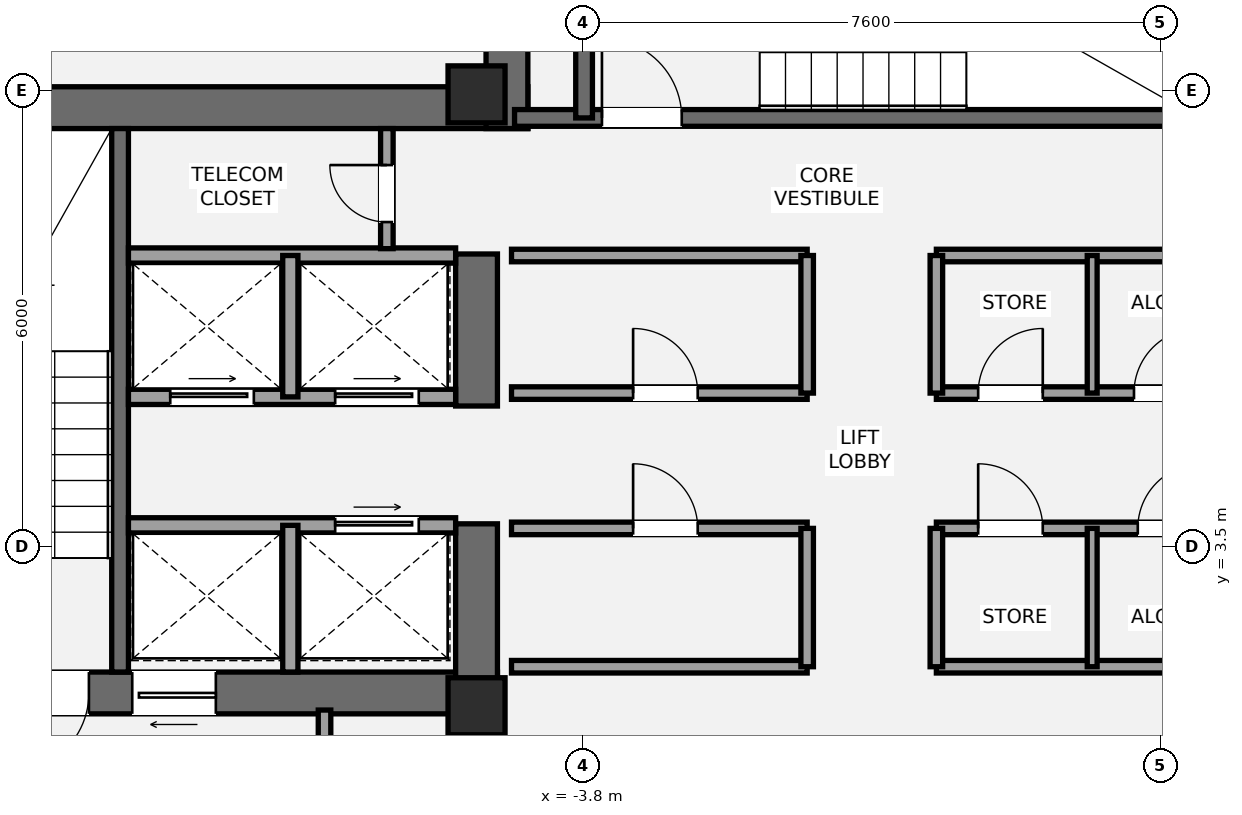
"""IFC4 building model, lengths in metres.
Left out: names, types, materials, properties, quantities, classifications, styles, units other than length and angle.
Written with IfcOpenShell. Run it as: python <this file> out.ifc"""

import sys

from ifc_helpers import new_model, si_unit, direction, frame, frame_2d, origin, origin_2d, place, context, subcontext, project, spatial, rectangle, extrude, element, fill, save


model = new_model("IFC4")
c1 = context("Model", 3, precision=1e-05, world=origin(), true_north=direction((0.0, 1.0)))
c2 = subcontext(c1, "Body", "Model", "MODEL_VIEW")
j1 = project(units=[si_unit("LENGTHUNIT", "METRE"), si_unit("PLANEANGLEUNIT", "RADIAN")], contexts=[c1])
p1 = place(None, origin())
s1 = spatial("IfcSite", under=j1, at=p1, CompositionType="ELEMENT")
p2 = place(p1, origin())
s2 = spatial("IfcBuilding", under=s1, at=p2, CompositionType="ELEMENT")
p3 = place(p2, frame((0.0, 0.0, 250.95)))
s3 = spatial("IfcBuildingStorey", under=s2, at=p3, CompositionType="ELEMENT", Elevation=250.95)
p4 = place(p3, frame((-13.7, 9.275, 0.0), z_axis=(0.0, 0.0, 1.0), x_axis=(1.0, 0.0, 0.0)))
e1 = element("IfcWall", 1, at=p4, inside=s3, PredefinedType="SHEAR", context=c2, shape_type="SweptSolid", body=[
    extrude(rectangle(XDim=9.175, YDim=0.55, at=frame_2d((4.587, 0.0))), origin(), (0.0, 0.0, 1.0), 3.15),
])
p5 = place(p3, frame((-4.925, 1.575, 0.0), z_axis=(0.0, 0.0, 1.0), x_axis=(-1.0, 0.0, 0.0)))
e2 = element("IfcWall", 2, at=p5, inside=s3, PredefinedType="SHEAR", context=c2, shape_type="SweptSolid", body=[
    extrude(rectangle(XDim=8.775, YDim=0.55, at=frame_2d((4.387, 0.0))), origin(), (0.0, 0.0, 1.0), 3.15),
])
p6 = place(p5, frame((5.375, 0.0, 0.0)))
e3 = element("IfcOpeningElement", 3, at=p6, cuts=e2, PredefinedType="OPENING", context=c2, shape_type="SweptSolid", body=[
    extrude(rectangle(XDim=1.05, YDim=2.15, at=frame_2d((0.525, 1.075))), frame((0.0, 0.285, 0.0), z_axis=(0.0, -1.0, 0.0), x_axis=(1.0, 0.0, 0.0)), (0.0, 0.0, 1.0), 0.57),
])
p7 = place(p5, frame((3.705, 0.0, 0.0)))
e4 = element("IfcOpeningElement", 4, at=p7, cuts=e2, PredefinedType="OPENING", context=c2, shape_type="SweptSolid", body=[
    extrude(rectangle(XDim=1.1, YDim=2.2, at=frame_2d((0.55, 1.1))), frame((0.0, 0.285, 0.0), z_axis=(0.0, -1.0, 0.0), x_axis=(1.0, 0.0, 0.0)), (0.0, 0.0, 1.0), 0.57),
])
p8 = place(p3, frame((-5.2, 1.3, 0.0), z_axis=(0.0, 0.0, 1.0), x_axis=(0.0, 1.0, 0.0)))
e5 = element("IfcWall", 5, at=p8, inside=s3, PredefinedType="SHEAR", context=c2, shape_type="SweptSolid", body=[
    extrude(rectangle(XDim=2.5, YDim=0.55, at=frame_2d((1.25, 0.0))), origin(), (0.0, 0.0, 1.0), 3.15),
])
p9 = place(p3, frame((-5.2, 5.35, 0.0), z_axis=(0.0, 0.0, 1.0), x_axis=(0.0, 1.0, 0.0)))
e6 = element("IfcWall", 6, at=p9, inside=s3, PredefinedType="SHEAR", context=c2, shape_type="SweptSolid", body=[
    extrude(rectangle(XDim=2.0, YDim=0.55, at=frame_2d((1.0, 0.0))), origin(), (0.0, 0.0, 1.0), 3.15),
])
p10 = place(p3, frame((-9.89, 1.85, 0.0), z_axis=(0.0, 0.0, 1.0), x_axis=(0.0, 1.0, 0.0)))
e7 = element("IfcWall", 7, at=p10, inside=s3, PredefinedType="SHEAR", context=c2, shape_type="SweptSolid", body=[
    extrude(rectangle(XDim=7.15, YDim=0.22, at=frame_2d((3.575, 0.0))), origin(), (0.0, 0.0, 1.0), 3.15),
])
p11 = place(p3, frame((-4.8, 9.0, 0.0), z_axis=(0.0, 0.0, 1.0), x_axis=(0.0, 1.0, 0.0)))
e8 = element("IfcWall", 8, at=p11, inside=s3, PredefinedType="SHEAR", context=c2, shape_type="SweptSolid", body=[
    extrude(rectangle(XDim=3.95, YDim=0.55, at=frame_2d((1.975, 0.0))), origin(), (0.0, 0.0, 1.0), 3.15),
])
p12 = place(p3, frame((-4.7, 9.14, 0.0), z_axis=(0.0, 0.0, 1.0), x_axis=(1.0, 0.0, 0.0)))
e9 = element("IfcWall", 9, at=p12, inside=s3, PredefinedType="SHEAR", context=c2, shape_type="SweptSolid", body=[
    extrude(rectangle(XDim=9.3, YDim=0.22, at=frame_2d((4.65, 0.0))), origin(), (0.0, 0.0, 1.0), 3.15),
])
p13 = place(p12, frame((1.15, 0.0, 0.0)))
e10 = element("IfcOpeningElement", 10, at=p13, cuts=e9, PredefinedType="OPENING", context=c2, shape_type="SweptSolid", body=[
    extrude(rectangle(XDim=1.05, YDim=2.15, at=frame_2d((0.525, 1.075))), frame((0.0, 0.12, 0.0), z_axis=(0.0, -1.0, 0.0), x_axis=(1.0, 0.0, 0.0)), (0.0, 0.0, 1.0), 0.24),
])
p14 = place(p3, frame((-3.785, 9.14, 0.0), z_axis=(0.0, 0.0, 1.0), x_axis=(0.0, 1.0, 0.0)))
e11 = element("IfcWall", 11, at=p14, inside=s3, PredefinedType="SHEAR", context=c2, shape_type="SweptSolid", body=[
    extrude(rectangle(XDim=3.26, YDim=0.22, at=frame_2d((1.63, 0.0))), origin(), (0.0, 0.0, 1.0), 3.15),
])
for number, where, z_axis, x_axis in (
    (12, (-5.2, 1.4, 0.0), (0.0, 0.0, 1.0), (1.0, 0.0, 0.0)),
    (13, (-5.2, 9.45, 0.0), (0.0, 0.0, 1.0), (1.0, 0.0, 0.0)),
):
    element("IfcColumn", number, at=place(p3, frame(where, z_axis=z_axis, x_axis=x_axis)), inside=s3, PredefinedType="PILASTER", context=c2, shape_type="SweptSolid", body=[
        extrude(rectangle(XDim=0.75, YDim=0.75, at=origin_2d()), origin(), (0.0, 0.0, 1.0), 3.15),
    ])
p15 = place(p3, frame((-7.2, -2.15, 0.0), z_axis=(0.0, 0.0, 1.0), x_axis=(0.0, 1.0, 0.0)))
e14 = element("IfcWall", 14, at=p15, inside=s3, PredefinedType="PARTITIONING", context=c2, shape_type="SweptSolid", body=[
    extrude(rectangle(XDim=3.5, YDim=0.165, at=frame_2d((1.75, 0.0))), origin(), (0.0, 0.0, 1.0), 2.423),
])
p16 = place(p3, frame((-4.95, -2.15, 0.0), z_axis=(0.0, 0.0, 1.0), x_axis=(0.0, 1.0, 0.0)))
e15 = element("IfcWall", 15, at=p16, inside=s3, PredefinedType="SOLIDWALL", context=c2, shape_type="SweptSolid", body=[
    extrude(rectangle(XDim=3.5, YDim=0.2, at=frame_2d((1.75, 0.0))), origin(), (0.0, 0.0, 1.0), 2.423),
])
p17 = place(p16, frame((0.95, 0.0, 0.0)))
e16 = element("IfcOpeningElement", 16, at=p17, cuts=e15, PredefinedType="OPENING", context=c2, shape_type="SweptSolid", body=[
    extrude(rectangle(XDim=0.75, YDim=2.1, at=frame_2d((0.375, 1.05))), frame((0.0, 0.11, 0.0), z_axis=(0.0, -1.0, 0.0), x_axis=(1.0, 0.0, 0.0)), (0.0, 0.0, 1.0), 0.22),
])
p18 = place(p3, frame((-9.78, 3.78, 0.0), z_axis=(0.0, 0.0, 1.0), x_axis=(1.0, 0.0, 0.0)))
e17 = element("IfcWall", 17, at=p18, inside=s3, PredefinedType="SOLIDWALL", context=c2, shape_type="SweptSolid", body=[
    extrude(rectangle(XDim=4.305, YDim=0.2, at=frame_2d((2.152, 0.0))), origin(), (0.0, 0.0, 1.0), 2.97),
])
p19 = place(p18, frame((2.72, 0.0, 0.0)))
e18 = element("IfcOpeningElement", 18, at=p19, cuts=e17, PredefinedType="OPENING", context=c2, shape_type="SweptSolid", body=[
    extrude(rectangle(XDim=1.1, YDim=2.2, at=frame_2d((0.55, 1.1))), frame((0.0, 0.11, 0.0), z_axis=(0.0, -1.0, 0.0), x_axis=(1.0, 0.0, 0.0)), (0.0, 0.0, 1.0), 0.22),
])
p20 = place(p3, frame((-7.65, 1.85, 0.0), z_axis=(0.0, 0.0, 1.0), x_axis=(0.0, 1.0, 0.0)))
e19 = element("IfcWall", 19, at=p20, inside=s3, PredefinedType="SOLIDWALL", context=c2, shape_type="SweptSolid", body=[
    extrude(rectangle(XDim=1.93, YDim=0.2, at=frame_2d((0.965, 0.0))), origin(), (0.0, 0.0, 1.0), 2.97),
])
p21 = place(p3, frame((-9.78, 5.47, 0.0), z_axis=(0.0, 0.0, 1.0), x_axis=(1.0, 0.0, 0.0)))
e20 = element("IfcWall", 20, at=p21, inside=s3, PredefinedType="SOLIDWALL", context=c2, shape_type="SweptSolid", body=[
    extrude(rectangle(XDim=4.305, YDim=0.2, at=frame_2d((2.152, 0.0))), origin(), (0.0, 0.0, 1.0), 2.97),
])
p22 = place(p21, frame((0.55, 0.0, 0.0)))
e21 = element("IfcOpeningElement", 21, at=p22, cuts=e20, PredefinedType="OPENING", context=c2, shape_type="SweptSolid", body=[
    extrude(rectangle(XDim=1.1, YDim=2.2, at=frame_2d((0.55, 1.1))), frame((0.0, 0.11, 0.0), z_axis=(0.0, -1.0, 0.0), x_axis=(1.0, 0.0, 0.0)), (0.0, 0.0, 1.0), 0.22),
])
p23 = place(p21, frame((2.72, 0.0, 0.0)))
e22 = element("IfcOpeningElement", 22, at=p23, cuts=e20, PredefinedType="OPENING", context=c2, shape_type="SweptSolid", body=[
    extrude(rectangle(XDim=1.1, YDim=2.2, at=frame_2d((0.55, 1.1))), frame((0.0, 0.11, 0.0), z_axis=(0.0, -1.0, 0.0), x_axis=(1.0, 0.0, 0.0)), (0.0, 0.0, 1.0), 0.22),
])
p24 = place(p3, frame((-9.78, 7.33, 0.0), z_axis=(0.0, 0.0, 1.0), x_axis=(1.0, 0.0, 0.0)))
e23 = element("IfcWall", 23, at=p24, inside=s3, PredefinedType="SOLIDWALL", context=c2, shape_type="SweptSolid", body=[
    extrude(rectangle(XDim=4.305, YDim=0.2, at=frame_2d((2.152, 0.0))), origin(), (0.0, 0.0, 1.0), 2.97),
])
p25 = place(p3, frame((-7.65, 5.47, 0.0), z_axis=(0.0, 0.0, 1.0), x_axis=(0.0, 1.0, 0.0)))
e24 = element("IfcWall", 24, at=p25, inside=s3, PredefinedType="SOLIDWALL", context=c2, shape_type="SweptSolid", body=[
    extrude(rectangle(XDim=1.86, YDim=0.2, at=frame_2d((0.93, 0.0))), origin(), (0.0, 0.0, 1.0), 2.97),
])
p26 = place(p3, frame((-4.74, 1.92, 0.0), z_axis=(0.0, 0.0, 1.0), x_axis=(1.0, 0.0, 0.0)))
e25 = element("IfcWall", 25, at=p26, inside=s3, PredefinedType="PARTITIONING", context=c2, shape_type="SweptSolid", body=[
    extrude(rectangle(XDim=3.89, YDim=0.165, at=frame_2d((1.945, 0.0))), origin(), (0.0, 0.0, 1.0), 2.11),
])
p27 = place(p3, frame((-4.74, 3.74, 0.0), z_axis=(0.0, 0.0, 1.0), x_axis=(1.0, 0.0, 0.0)))
e26 = element("IfcWall", 26, at=p27, inside=s3, PredefinedType="PARTITIONING", context=c2, shape_type="SweptSolid", body=[
    extrude(rectangle(XDim=3.89, YDim=0.165, at=frame_2d((1.945, 0.0))), origin(), (0.0, 0.0, 1.0), 2.97),
])
p28 = place(p27, frame((1.6, 0.0, 0.0)))
e27 = element("IfcOpeningElement", 27, at=p28, cuts=e26, PredefinedType="OPENING", context=c2, shape_type="SweptSolid", body=[
    extrude(rectangle(XDim=0.85, YDim=2.1, at=frame_2d((0.425, 1.05))), frame((0.0, 0.093, 0.0), z_axis=(0.0, -1.0, 0.0), x_axis=(1.0, 0.0, 0.0)), (0.0, 0.0, 1.0), 0.185),
])
p29 = place(p3, frame((-0.85, 1.92, 0.0), z_axis=(0.0, 0.0, 1.0), x_axis=(0.0, 1.0, 0.0)))
e28 = element("IfcWall", 28, at=p29, inside=s3, PredefinedType="PARTITIONING", context=c2, shape_type="SweptSolid", body=[
    extrude(rectangle(XDim=1.82, YDim=0.165, at=frame_2d((0.91, 0.0))), origin(), (0.0, 0.0, 1.0), 2.97),
])
p30 = place(p3, frame((0.85, 1.92, 0.0), z_axis=(0.0, 0.0, 1.0), x_axis=(1.0, 0.0, 0.0)))
e29 = element("IfcWall", 29, at=p30, inside=s3, PredefinedType="PARTITIONING", context=c2, shape_type="SweptSolid", body=[
    extrude(rectangle(XDim=3.89, YDim=0.165, at=frame_2d((1.945, 0.0))), origin(), (0.0, 0.0, 1.0), 2.11),
])
p31 = place(p3, frame((0.85, 3.74, 0.0), z_axis=(0.0, 0.0, 1.0), x_axis=(1.0, 0.0, 0.0)))
e30 = element("IfcWall", 30, at=p31, inside=s3, PredefinedType="PARTITIONING", context=c2, shape_type="SweptSolid", body=[
    extrude(rectangle(XDim=3.89, YDim=0.165, at=frame_2d((1.945, 0.0))), origin(), (0.0, 0.0, 1.0), 2.97),
])
p32 = place(p31, frame((0.55, 0.0, 0.0)))
e31 = element("IfcOpeningElement", 31, at=p32, cuts=e30, PredefinedType="OPENING", context=c2, shape_type="SweptSolid", body=[
    extrude(rectangle(XDim=0.85, YDim=2.1, at=frame_2d((0.425, 1.05))), frame((0.0, 0.093, 0.0), z_axis=(0.0, -1.0, 0.0), x_axis=(1.0, 0.0, 0.0)), (0.0, 0.0, 1.0), 0.185),
])
p33 = place(p31, frame((2.65, 0.0, 0.0)))
e32 = element("IfcOpeningElement", 32, at=p33, cuts=e30, PredefinedType="OPENING", context=c2, shape_type="SweptSolid", body=[
    extrude(rectangle(XDim=0.85, YDim=2.1, at=frame_2d((0.425, 1.05))), frame((0.0, 0.093, 0.0), z_axis=(0.0, -1.0, 0.0), x_axis=(1.0, 0.0, 0.0)), (0.0, 0.0, 1.0), 0.185),
])
p34 = place(p3, frame((0.85, 1.92, 0.0), z_axis=(0.0, 0.0, 1.0), x_axis=(0.0, 1.0, 0.0)))
e33 = element("IfcWall", 33, at=p34, inside=s3, PredefinedType="PARTITIONING", context=c2, shape_type="SweptSolid", body=[
    extrude(rectangle(XDim=1.82, YDim=0.165, at=frame_2d((0.91, 0.0))), origin(), (0.0, 0.0, 1.0), 2.97),
])
p35 = place(p3, frame((2.9, 1.92, 0.0), z_axis=(0.0, 0.0, 1.0), x_axis=(0.0, 1.0, 0.0)))
e34 = element("IfcWall", 34, at=p35, inside=s3, PredefinedType="PARTITIONING", context=c2, shape_type="SweptSolid", body=[
    extrude(rectangle(XDim=1.82, YDim=0.13, at=frame_2d((0.91, 0.0))), origin(), (0.0, 0.0, 1.0), 2.97),
])
p36 = place(p3, frame((-4.74, 5.52, 0.0), z_axis=(0.0, 0.0, 1.0), x_axis=(1.0, 0.0, 0.0)))
e35 = element("IfcWall", 35, at=p36, inside=s3, PredefinedType="PARTITIONING", context=c2, shape_type="SweptSolid", body=[
    extrude(rectangle(XDim=3.89, YDim=0.165, at=frame_2d((1.945, 0.0))), origin(), (0.0, 0.0, 1.0), 2.97),
])
p37 = place(p36, frame((1.6, 0.0, 0.0)))
e36 = element("IfcOpeningElement", 36, at=p37, cuts=e35, PredefinedType="OPENING", context=c2, shape_type="SweptSolid", body=[
    extrude(rectangle(XDim=0.85, YDim=2.1, at=frame_2d((0.425, 1.05))), frame((0.0, 0.093, 0.0), z_axis=(0.0, -1.0, 0.0), x_axis=(1.0, 0.0, 0.0)), (0.0, 0.0, 1.0), 0.185),
])
p38 = place(p3, frame((-4.74, 7.33, 0.0), z_axis=(0.0, 0.0, 1.0), x_axis=(1.0, 0.0, 0.0)))
e37 = element("IfcWall", 37, at=p38, inside=s3, PredefinedType="PARTITIONING", context=c2, shape_type="SweptSolid", body=[
    extrude(rectangle(XDim=3.89, YDim=0.165, at=frame_2d((1.945, 0.0))), origin(), (0.0, 0.0, 1.0), 2.97),
])
p39 = place(p3, frame((-0.85, 5.52, 0.0), z_axis=(0.0, 0.0, 1.0), x_axis=(0.0, 1.0, 0.0)))
e38 = element("IfcWall", 38, at=p39, inside=s3, PredefinedType="PARTITIONING", context=c2, shape_type="SweptSolid", body=[
    extrude(rectangle(XDim=1.81, YDim=0.165, at=frame_2d((0.905, 0.0))), origin(), (0.0, 0.0, 1.0), 2.97),
])
p40 = place(p3, frame((0.85, 5.52, 0.0), z_axis=(0.0, 0.0, 1.0), x_axis=(1.0, 0.0, 0.0)))
e39 = element("IfcWall", 39, at=p40, inside=s3, PredefinedType="PARTITIONING", context=c2, shape_type="SweptSolid", body=[
    extrude(rectangle(XDim=3.89, YDim=0.165, at=frame_2d((1.945, 0.0))), origin(), (0.0, 0.0, 1.0), 2.97),
])
p41 = place(p40, frame((0.55, 0.0, 0.0)))
e40 = element("IfcOpeningElement", 40, at=p41, cuts=e39, PredefinedType="OPENING", context=c2, shape_type="SweptSolid", body=[
    extrude(rectangle(XDim=0.85, YDim=2.1, at=frame_2d((0.425, 1.05))), frame((0.0, 0.093, 0.0), z_axis=(0.0, -1.0, 0.0), x_axis=(1.0, 0.0, 0.0)), (0.0, 0.0, 1.0), 0.185),
])
p42 = place(p40, frame((2.6, 0.0, 0.0)))
e41 = element("IfcOpeningElement", 41, at=p42, cuts=e39, PredefinedType="OPENING", context=c2, shape_type="SweptSolid", body=[
    extrude(rectangle(XDim=0.85, YDim=2.1, at=frame_2d((0.425, 1.05))), frame((0.0, 0.093, 0.0), z_axis=(0.0, -1.0, 0.0), x_axis=(1.0, 0.0, 0.0)), (0.0, 0.0, 1.0), 0.185),
])
p43 = place(p3, frame((0.85, 7.33, 0.0), z_axis=(0.0, 0.0, 1.0), x_axis=(1.0, 0.0, 0.0)))
e42 = element("IfcWall", 42, at=p43, inside=s3, PredefinedType="PARTITIONING", context=c2, shape_type="SweptSolid", body=[
    extrude(rectangle(XDim=3.89, YDim=0.165, at=frame_2d((1.945, 0.0))), origin(), (0.0, 0.0, 1.0), 2.97),
])
p44 = place(p3, frame((0.85, 5.52, 0.0), z_axis=(0.0, 0.0, 1.0), x_axis=(0.0, 1.0, 0.0)))
e43 = element("IfcWall", 43, at=p44, inside=s3, PredefinedType="PARTITIONING", context=c2, shape_type="SweptSolid", body=[
    extrude(rectangle(XDim=1.81, YDim=0.165, at=frame_2d((0.905, 0.0))), origin(), (0.0, 0.0, 1.0), 2.97),
])
p45 = place(p3, frame((2.9, 5.52, 0.0), z_axis=(0.0, 0.0, 1.0), x_axis=(0.0, 1.0, 0.0)))
e44 = element("IfcWall", 44, at=p45, inside=s3, PredefinedType="PARTITIONING", context=c2, shape_type="SweptSolid", body=[
    extrude(rectangle(XDim=1.81, YDim=0.13, at=frame_2d((0.905, 0.0))), origin(), (0.0, 0.0, 1.0), 2.97),
])
p46 = place(p3, frame((-6.38, 7.42, 0.0), z_axis=(0.0, 0.0, 1.0), x_axis=(0.0, 1.0, 0.0)))
e45 = element("IfcWall", 45, at=p46, inside=s3, PredefinedType="PARTITIONING", context=c2, shape_type="SweptSolid", body=[
    extrude(rectangle(XDim=1.58, YDim=0.165, at=frame_2d((0.79, 0.0))), origin(), (0.0, 0.0, 1.0), 2.97),
])
p47 = place(p46, frame((0.35, 0.0, 0.0)))
e46 = element("IfcOpeningElement", 46, at=p47, cuts=e45, PredefinedType="OPENING", context=c2, shape_type="SweptSolid", body=[
    extrude(rectangle(XDim=0.75, YDim=2.1, at=frame_2d((0.375, 1.05))), frame((0.0, 0.093, 0.0), z_axis=(0.0, -1.0, 0.0), x_axis=(1.0, 0.0, 0.0)), (0.0, 0.0, 1.0), 0.185),
])
p48 = place(p6, origin())
e47 = element("IfcDoor", 47, at=p48, inside=s3, OperationType="SINGLE_SWING_RIGHT", PredefinedType="DOOR", context=c2, shape_type="SweptSolid", body=[
    extrude(rectangle(XDim=1.05, YDim=2.15, at=frame_2d((0.525, 1.075))), frame((0.0, 0.025, 0.0), z_axis=(0.0, -1.0, 0.0), x_axis=(1.0, 0.0, 0.0)), (0.0, 0.0, 1.0), 0.05),
])
fill(e3, e47)
p49 = place(p13, origin())
e48 = element("IfcDoor", 48, at=p49, inside=s3, OperationType="SINGLE_SWING_LEFT", PredefinedType="DOOR", context=c2, shape_type="SweptSolid", body=[
    extrude(rectangle(XDim=1.05, YDim=2.15, at=frame_2d((0.525, 1.075))), frame((0.0, 0.025, 0.0), z_axis=(0.0, -1.0, 0.0), x_axis=(1.0, 0.0, 0.0)), (0.0, 0.0, 1.0), 0.05),
])
fill(e10, e48)
p50 = place(p7, origin())
e49 = element("IfcDoor", 49, at=p50, inside=s3, OperationType="SLIDING_TO_LEFT", PredefinedType="DOOR", context=c2, shape_type="SweptSolid", body=[
    extrude(rectangle(XDim=1.1, YDim=2.2, at=frame_2d((0.55, 1.1))), frame((0.0, 0.025, 0.0), z_axis=(0.0, -1.0, 0.0), x_axis=(1.0, 0.0, 0.0)), (0.0, 0.0, 1.0), 0.05),
])
fill(e4, e49)
p51 = place(p22, origin())
e50 = element("IfcDoor", 50, at=p51, inside=s3, OperationType="SLIDING_TO_LEFT", PredefinedType="DOOR", context=c2, shape_type="SweptSolid", body=[
    extrude(rectangle(XDim=1.1, YDim=2.2, at=frame_2d((0.55, 1.1))), frame((0.0, 0.025, 0.0), z_axis=(0.0, -1.0, 0.0), x_axis=(1.0, 0.0, 0.0)), (0.0, 0.0, 1.0), 0.05),
])
fill(e21, e50)
p52 = place(p23, origin())
e51 = element("IfcDoor", 51, at=p52, inside=s3, OperationType="SLIDING_TO_LEFT", PredefinedType="DOOR", context=c2, shape_type="SweptSolid", body=[
    extrude(rectangle(XDim=1.1, YDim=2.2, at=frame_2d((0.55, 1.1))), frame((0.0, 0.025, 0.0), z_axis=(0.0, -1.0, 0.0), x_axis=(1.0, 0.0, 0.0)), (0.0, 0.0, 1.0), 0.05),
])
fill(e22, e51)
p53 = place(p19, origin())
e52 = element("IfcDoor", 52, at=p53, inside=s3, OperationType="SLIDING_TO_LEFT", PredefinedType="DOOR", context=c2, shape_type="SweptSolid", body=[
    extrude(rectangle(XDim=1.1, YDim=2.2, at=frame_2d((0.55, 1.1))), frame((0.0, 0.025, 0.0), z_axis=(0.0, -1.0, 0.0), x_axis=(1.0, 0.0, 0.0)), (0.0, 0.0, 1.0), 0.05),
])
fill(e18, e52)
p54 = place(p28, origin())
e53 = element("IfcDoor", 53, at=p54, inside=s3, OperationType="SINGLE_SWING_LEFT", PredefinedType="DOOR", context=c2, shape_type="SweptSolid", body=[
    extrude(rectangle(XDim=0.85, YDim=2.1, at=frame_2d((0.425, 1.05))), frame((0.0, 0.025, 0.0), z_axis=(0.0, -1.0, 0.0), x_axis=(1.0, 0.0, 0.0)), (0.0, 0.0, 1.0), 0.05),
])
fill(e27, e53)
p55 = place(p32, origin())
e54 = element("IfcDoor", 54, at=p55, inside=s3, OperationType="SINGLE_SWING_LEFT", PredefinedType="DOOR", context=c2, shape_type="SweptSolid", body=[
    extrude(rectangle(XDim=0.85, YDim=2.1, at=frame_2d((0.425, 1.05))), frame((0.0, 0.025, 0.0), z_axis=(0.0, -1.0, 0.0), x_axis=(1.0, 0.0, 0.0)), (0.0, 0.0, 1.0), 0.05),
])
fill(e31, e54)
p56 = place(p33, origin())
e55 = element("IfcDoor", 55, at=p56, inside=s3, OperationType="SINGLE_SWING_RIGHT", PredefinedType="DOOR", context=c2, shape_type="SweptSolid", body=[
    extrude(rectangle(XDim=0.85, YDim=2.1, at=frame_2d((0.425, 1.05))), frame((0.0, 0.025, 0.0), z_axis=(0.0, -1.0, 0.0), x_axis=(1.0, 0.0, 0.0)), (0.0, 0.0, 1.0), 0.05),
])
fill(e32, e55)
p57 = place(p37, origin())
e56 = element("IfcDoor", 56, at=p57, inside=s3, OperationType="SINGLE_SWING_LEFT", PredefinedType="DOOR", context=c2, shape_type="SweptSolid", body=[
    extrude(rectangle(XDim=0.85, YDim=2.1, at=frame_2d((0.425, 1.05))), frame((0.0, 0.025, 0.0), z_axis=(0.0, -1.0, 0.0), x_axis=(1.0, 0.0, 0.0)), (0.0, 0.0, 1.0), 0.05),
])
fill(e36, e56)
p58 = place(p41, origin())
e57 = element("IfcDoor", 57, at=p58, inside=s3, OperationType="SINGLE_SWING_RIGHT", PredefinedType="DOOR", context=c2, shape_type="SweptSolid", body=[
    extrude(rectangle(XDim=0.85, YDim=2.1, at=frame_2d((0.425, 1.05))), frame((0.0, 0.025, 0.0), z_axis=(0.0, -1.0, 0.0), x_axis=(1.0, 0.0, 0.0)), (0.0, 0.0, 1.0), 0.05),
])
fill(e40, e57)
p59 = place(p42, origin())
e58 = element("IfcDoor", 58, at=p59, inside=s3, OperationType="SINGLE_SWING_RIGHT", PredefinedType="DOOR", context=c2, shape_type="SweptSolid", body=[
    extrude(rectangle(XDim=0.85, YDim=2.1, at=frame_2d((0.425, 1.05))), frame((0.0, 0.025, 0.0), z_axis=(0.0, -1.0, 0.0), x_axis=(1.0, 0.0, 0.0)), (0.0, 0.0, 1.0), 0.05),
])
fill(e41, e58)
p60 = place(p47, origin())
e59 = element("IfcDoor", 59, at=p60, inside=s3, OperationType="SINGLE_SWING_RIGHT", PredefinedType="DOOR", context=c2, shape_type="SweptSolid", body=[
    extrude(rectangle(XDim=0.75, YDim=2.1, at=frame_2d((0.375, 1.05))), frame((0.0, 0.025, 0.0), z_axis=(0.0, -1.0, 0.0), x_axis=(1.0, 0.0, 0.0)), (0.0, 0.0, 1.0), 0.05),
])
fill(e46, e59)
save(model, sys.argv[1])
